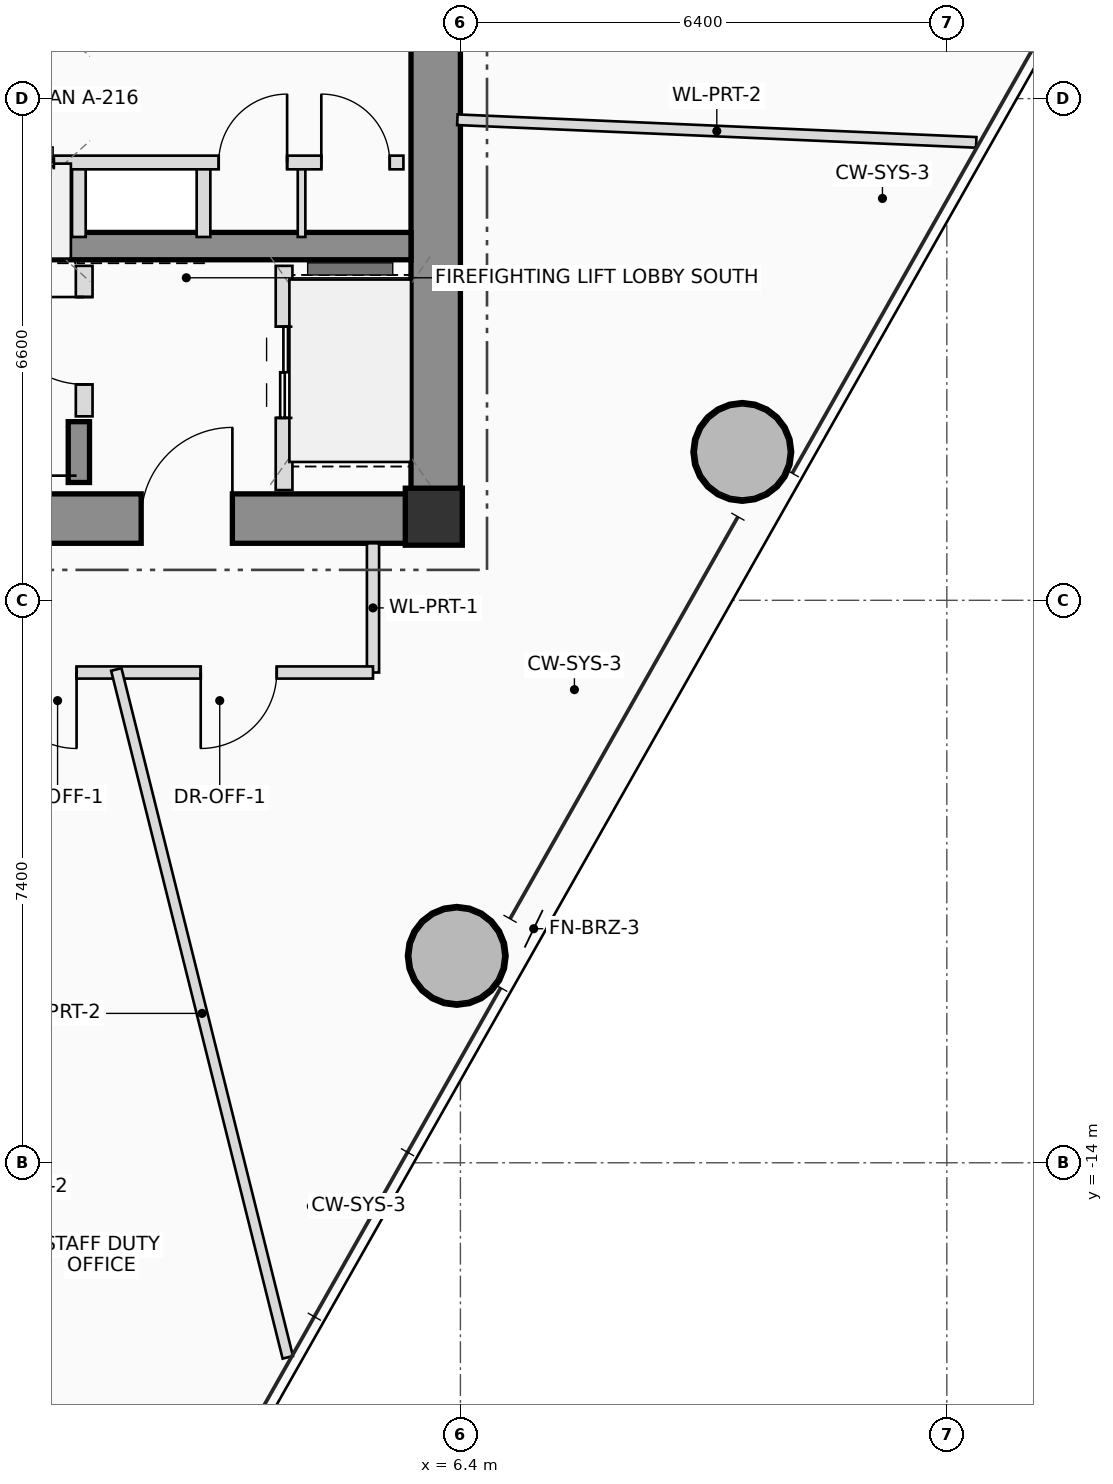
"""IFC4 building model, lengths in metres.
Left out: names, types, materials, properties, quantities, classifications, styles, units other than length and angle.
Written with IfcOpenShell. Run it as: python <this file> out.ifc"""

import sys

from ifc_helpers import new_model, si_unit, direction, frame, frame_2d, origin, origin_2d, place, context, subcontext, project, spatial, rectangle, hollow_circle, extrude, source, transform, mapped, element, fill, save


model = new_model("IFC4")
c1 = context("Model", 3, precision=1e-05, world=origin(), true_north=direction((0.0, 1.0)))
c2 = subcontext(c1, "Body", "Model", "MODEL_VIEW")
j1 = project(units=[si_unit("LENGTHUNIT", "METRE"), si_unit("PLANEANGLEUNIT", "RADIAN")], contexts=[c1])
p1 = place(None, origin())
s1 = spatial("IfcSite", under=j1, at=p1, CompositionType="ELEMENT")
p2 = place(p1, origin())
s2 = spatial("IfcBuilding", under=s1, at=p2, CompositionType="ELEMENT")
p3 = place(p2, frame((0.0, 0.0, 172.55)))
s3 = spatial("IfcBuildingStorey", under=s2, at=p3, CompositionType="ELEMENT", Elevation=172.55)
m1 = source(origin(), c2, "Body", "SweptSolid", [
    extrude(rectangle(XDim=0.75, YDim=0.75, at=origin_2d()), origin(), (0.0, 0.0, 1.0), 3.45),
])
p4 = place(p3, frame((6.05, -5.5, 0.0), z_axis=(0.0, 0.0, 1.0), x_axis=(1.0, 0.0, 0.0)))
e1 = element("IfcColumn", 1, at=p4, inside=s3, PredefinedType="COLUMN", context=c2, shape_type="MappedRepresentation", body=[
    mapped(m1, transform((0.0, 0.0, 0.0), scale=1.0)),
])
p5 = place(p3, frame((-6.4, -5.525, 0.0), z_axis=(0.0, 0.0, 1.0), x_axis=(1.0, 0.0, 0.0)))
e2 = element("IfcWall", 2, at=p5, inside=s3, PredefinedType="SHEAR", context=c2, shape_type="SweptSolid", body=[
    extrude(rectangle(XDim=12.8, YDim=0.65, at=frame_2d((6.4, 0.0))), origin(), (0.0, 0.0, 1.0), 3.45),
])
p6 = place(p5, frame((8.6, 0.0, 0.0)))
e3 = element("IfcOpeningElement", 3, at=p6, cuts=e2, PredefinedType="OPENING", context=c2, shape_type="SweptSolid", body=[
    extrude(rectangle(XDim=1.2, YDim=2.2, at=frame_2d((0.6, 1.1))), frame((0.0, 0.335, 0.0), z_axis=(0.0, -1.0, 0.0), x_axis=(1.0, 0.0, 0.0)), (0.0, 0.0, 1.0), 0.67),
])
p7 = place(p3, frame((6.075, -5.2, 0.0), z_axis=(0.0, 0.0, 1.0), x_axis=(0.0, 1.0, 0.0)))
e4 = element("IfcWall", 4, at=p7, inside=s3, PredefinedType="SHEAR", context=c2, shape_type="SweptSolid", body=[
    extrude(rectangle(XDim=10.4, YDim=0.65, at=frame_2d((5.2, 0.0))), origin(), (0.0, 0.0, 1.0), 3.45),
])
p8 = place(p3, frame((-5.75, -1.94, 0.0), z_axis=(0.0, 0.0, 1.0), x_axis=(1.0, 0.0, 0.0)))
e5 = element("IfcWall", 5, at=p8, inside=s3, PredefinedType="SHEAR", context=c2, shape_type="SweptSolid", body=[
    extrude(rectangle(XDim=11.5, YDim=0.36, at=frame_2d((5.75, 0.0))), origin(), (0.0, 0.0, 1.0), 3.45),
])
p9 = place(p3, frame((1.38, -5.05, 0.0), z_axis=(0.0, 0.0, 1.0), x_axis=(0.0, 1.0, 0.0)))
e6 = element("IfcWall", 6, at=p9, inside=s3, PredefinedType="SHEAR", context=c2, shape_type="SweptSolid", body=[
    extrude(rectangle(XDim=0.8, YDim=0.28, at=frame_2d((0.4, 0.0))), origin(), (0.0, 0.0, 1.0), 3.45),
])
m2 = source(origin(), c2, "Body", "SweptSolid", [
    extrude(hollow_circle(Radius=0.65, WallThickness=0.045, at=origin_2d()), origin(), (0.0, 0.0, 1.0), 3.45),
])
for number, where, z_axis, x_axis in (
    (7, (6.352, -11.278, 0.0), (0.0, 0.0, 1.0), (1.0, 0.0, 0.0)),
    (8, (10.109, -4.648, 0.0), (0.0, 0.0, 1.0), (1.0, 0.0, 0.0)),
):
    element("IfcColumn", number, at=place(p3, frame(where, z_axis=z_axis, x_axis=x_axis)), inside=s3, PredefinedType="COLUMN", context=c2, shape_type="MappedRepresentation", body=[
        mapped(m2, transform((0.0, 0.0, 0.0), scale=1.0)),
    ])
p10 = place(p3, frame((1.45, -4.18, 0.0), z_axis=(0.0, 0.0, 1.0), x_axis=(0.0, 1.0, 0.0)))
e9 = element("IfcWall", 9, at=p10, inside=s3, PredefinedType="PLUMBINGWALL", context=c2, shape_type="SweptSolid", body=[
    extrude(rectangle(XDim=1.98, YDim=0.22, at=frame_2d((0.99, 0.0))), origin(), (0.0, 0.0, 1.0), 3.25),
])
p11 = place(p10, frame((0.42, 0.0, 0.0)))
e10 = element("IfcOpeningElement", 10, at=p11, cuts=e9, PredefinedType="OPENING", context=c2, shape_type="SweptSolid", body=[
    extrude(rectangle(XDim=1.15, YDim=2.15, at=frame_2d((0.575, 1.075))), frame((0.0, 0.12, 0.0), z_axis=(0.0, -1.0, 0.0), x_axis=(1.0, 0.0, 0.0)), (0.0, 0.0, 1.0), 0.24),
])
p12 = place(p3, frame((4.08, -5.15, 0.0), z_axis=(0.0, 0.0, 1.0), x_axis=(0.0, 1.0, 0.0)))
e11 = element("IfcWall", 11, at=p12, inside=s3, PredefinedType="PLUMBINGWALL", context=c2, shape_type="SweptSolid", body=[
    extrude(rectangle(XDim=2.95, YDim=0.22, at=frame_2d((1.475, 0.0))), origin(), (0.0, 0.0, 1.0), 3.25),
])
p13 = place(p12, frame((0.95, 0.0, 0.0)))
e12 = element("IfcOpeningElement", 12, at=p13, cuts=e11, PredefinedType="OPENING", context=c2, shape_type="SweptSolid", body=[
    extrude(rectangle(XDim=1.2, YDim=2.25, at=frame_2d((0.6, 1.125))), frame((0.0, 0.12, 0.0), z_axis=(0.0, -1.0, 0.0), x_axis=(1.0, 0.0, 0.0)), (0.0, 0.0, 1.0), 0.24),
])
for number, where, z_axis, x_axis in (
    (13, (1.38, -1.82, 0.0), (0.0, 0.0, 1.0), (0.0, 1.0, 0.0)),
    (14, (3.02, -1.82, 0.0), (0.0, 0.0, 1.0), (0.0, 1.0, 0.0)),
):
    element("IfcWall", number, at=place(p3, frame(where, z_axis=z_axis, x_axis=x_axis)), inside=s3, PredefinedType="PLUMBINGWALL", context=c2, shape_type="SweptSolid", body=[
        extrude(rectangle(XDim=0.98, YDim=0.18, at=frame_2d((0.49, 0.0))), origin(), (0.0, 0.0, 1.0), 3.25),
    ])
p14 = place(p3, frame((4.31, -1.82, 0.0), z_axis=(0.0, 0.0, 1.0), x_axis=(0.0, 1.0, 0.0)))
e15 = element("IfcWall", 15, at=p14, inside=s3, PredefinedType="PARTITIONING", context=c2, shape_type="SweptSolid", body=[
    extrude(rectangle(XDim=0.98, YDim=0.1, at=frame_2d((0.49, 0.0))), origin(), (0.0, 0.0, 1.0), 3.25),
])
p15 = place(p3, frame((-5.68, -0.84, 0.0), z_axis=(0.0, 0.0, 1.0), x_axis=(1.0, 0.0, 0.0)))
e16 = element("IfcWall", 16, at=p15, inside=s3, PredefinedType="PLUMBINGWALL", context=c2, shape_type="SweptSolid", body=[
    extrude(rectangle(XDim=11.33, YDim=0.18, at=frame_2d((5.665, 0.0))), origin(), (0.0, 0.0, 1.0), 3.25),
])
p16 = place(p15, frame((1.18, 0.0, 0.0)))
e17 = element("IfcOpeningElement", 17, at=p16, cuts=e16, PredefinedType="OPENING", context=c2, shape_type="SweptSolid", body=[
    extrude(rectangle(XDim=0.9, YDim=2.05, at=frame_2d((0.45, 1.025))), frame((0.0, 0.1, 0.0), z_axis=(0.0, -1.0, 0.0), x_axis=(1.0, 0.0, 0.0)), (0.0, 0.0, 1.0), 0.2),
])
p17 = place(p15, frame((3.93, 0.0, 0.0)))
e18 = element("IfcOpeningElement", 18, at=p17, cuts=e16, PredefinedType="OPENING", context=c2, shape_type="SweptSolid", body=[
    extrude(rectangle(XDim=1.1, YDim=2.2, at=frame_2d((0.55, 1.1))), frame((0.0, 0.1, 0.0), z_axis=(0.0, -1.0, 0.0), x_axis=(1.0, 0.0, 0.0)), (0.0, 0.0, 1.0), 0.2),
])
p18 = place(p15, frame((5.63, 0.0, 0.0)))
e19 = element("IfcOpeningElement", 19, at=p18, cuts=e16, PredefinedType="OPENING", context=c2, shape_type="SweptSolid", body=[
    extrude(rectangle(XDim=1.1, YDim=2.2, at=frame_2d((0.55, 1.1))), frame((0.0, 0.1, 0.0), z_axis=(0.0, -1.0, 0.0), x_axis=(1.0, 0.0, 0.0)), (0.0, 0.0, 1.0), 0.2),
])
p19 = place(p15, frame((8.9, 0.0, 0.0)))
e20 = element("IfcOpeningElement", 20, at=p19, cuts=e16, PredefinedType="OPENING", context=c2, shape_type="SweptSolid", body=[
    extrude(rectangle(XDim=0.9, YDim=2.05, at=frame_2d((0.45, 1.025))), frame((0.0, 0.1, 0.0), z_axis=(0.0, -1.0, 0.0), x_axis=(1.0, 0.0, 0.0)), (0.0, 0.0, 1.0), 0.2),
])
p20 = place(p15, frame((10.25, 0.0, 0.0)))
e21 = element("IfcOpeningElement", 21, at=p20, cuts=e16, PredefinedType="OPENING", context=c2, shape_type="SweptSolid", body=[
    extrude(rectangle(XDim=0.9, YDim=2.05, at=frame_2d((0.45, 1.025))), frame((0.0, 0.1, 0.0), z_axis=(0.0, -1.0, 0.0), x_axis=(1.0, 0.0, 0.0)), (0.0, 0.0, 1.0), 0.2),
])
p21 = place(p3, frame((5.25, -5.85, 0.0), z_axis=(0.0, 0.0, 1.0), x_axis=(0.0, -1.0, 0.0)))
e22 = element("IfcWall", 22, at=p21, inside=s3, PredefinedType="PARTITIONING", context=c2, shape_type="SweptSolid", body=[
    extrude(rectangle(XDim=1.7, YDim=0.16, at=frame_2d((0.85, 0.0))), origin(), (0.0, 0.0, 1.0), 3.25),
])
p22 = place(p3, frame((5.25, -7.55, 0.0), z_axis=(0.0, 0.0, 1.0), x_axis=(-1.0, 0.0, 0.0)))
e23 = element("IfcWall", 23, at=p22, inside=s3, PredefinedType="PARTITIONING", context=c2, shape_type="SweptSolid", body=[
    extrude(rectangle(XDim=11.61, YDim=0.16, at=frame_2d((5.805, 0.0))), origin(), (0.0, 0.0, 1.0), 2.605),
])
p23 = place(p22, frame((1.267, 0.0, 0.0)))
e24 = element("IfcOpeningElement", 24, at=p23, cuts=e23, PredefinedType="OPENING", context=c2, shape_type="SweptSolid", body=[
    extrude(rectangle(XDim=1.0, YDim=2.25, at=frame_2d((0.5, 1.125))), frame((0.0, 0.09, 0.0), z_axis=(0.0, -1.0, 0.0), x_axis=(1.0, 0.0, 0.0)), (0.0, 0.0, 1.0), 0.18),
])
p24 = place(p22, frame((3.9, 0.0, 0.0)))
e25 = element("IfcOpeningElement", 25, at=p24, cuts=e23, PredefinedType="OPENING", context=c2, shape_type="SweptSolid", body=[
    extrude(rectangle(XDim=1.0, YDim=2.25, at=frame_2d((0.5, 1.125))), frame((0.0, 0.09, 0.0), z_axis=(0.0, -1.0, 0.0), x_axis=(1.0, 0.0, 0.0)), (0.0, 0.0, 1.0), 0.18),
])
p25 = place(p22, frame((7.936, 0.0, 0.0)))
e26 = element("IfcOpeningElement", 26, at=p25, cuts=e23, PredefinedType="OPENING", context=c2, shape_type="SweptSolid", body=[
    extrude(rectangle(XDim=1.0, YDim=2.25, at=frame_2d((0.5, 1.125))), frame((0.0, 0.09, 0.0), z_axis=(0.0, -1.0, 0.0), x_axis=(1.0, 0.0, 0.0)), (0.0, 0.0, 1.0), 0.18),
])
p26 = place(p3, frame((6.36, -0.278, 0.0), z_axis=(0.0, 0.0, 1.0), x_axis=(0.999047983793, -0.043624833281, 0.0)))
e27 = element("IfcWall", 27, at=p26, inside=s3, PredefinedType="PARTITIONING", context=c2, shape_type="SweptSolid", body=[
    extrude(rectangle(XDim=6.833, YDim=0.14, at=frame_2d((3.417, 0.0))), origin(), (0.0, 0.0, 1.0), 2.605),
])
p27 = place(p3, frame((1.873, -7.51, 0.0), z_axis=(0.0, 0.0, 1.0), x_axis=(0.241919667538, -0.970296281791, 0.0)))
e28 = element("IfcWall", 28, at=p27, inside=s3, PredefinedType="PARTITIONING", context=c2, shape_type="SweptSolid", body=[
    extrude(rectangle(XDim=9.327, YDim=0.14, at=frame_2d((4.664, 0.0))), origin(), (0.0, 0.0, 1.0), 2.605),
])
p28 = place(p6, origin())
e29 = element("IfcDoor", 29, at=p28, inside=s3, OperationType="SINGLE_SWING_RIGHT", PredefinedType="DOOR", context=c2, shape_type="SweptSolid", body=[
    extrude(rectangle(XDim=1.2, YDim=2.2, at=frame_2d((0.6, 1.1))), frame((0.0, 0.025, 0.0), z_axis=(0.0, -1.0, 0.0), x_axis=(1.0, 0.0, 0.0)), (0.0, 0.0, 1.0), 0.05),
])
fill(e3, e29)
p29 = place(p11, origin())
e30 = element("IfcDoor", 30, at=p29, inside=s3, OperationType="SINGLE_SWING_RIGHT", PredefinedType="DOOR", context=c2, shape_type="SweptSolid", body=[
    extrude(rectangle(XDim=1.15, YDim=2.15, at=frame_2d((0.575, 1.075))), frame((0.0, 0.025, 0.0), z_axis=(0.0, -1.0, 0.0), x_axis=(1.0, 0.0, 0.0)), (0.0, 0.0, 1.0), 0.05),
])
fill(e10, e30)
p30 = place(p13, origin())
e31 = element("IfcDoor", 31, at=p30, inside=s3, OperationType="DOUBLE_DOOR_SLIDING", PredefinedType="DOOR", context=c2, shape_type="SweptSolid", body=[
    extrude(rectangle(XDim=1.2, YDim=2.25, at=frame_2d((0.6, 1.125))), frame((0.0, 0.025, 0.0), z_axis=(0.0, -1.0, 0.0), x_axis=(1.0, 0.0, 0.0)), (0.0, 0.0, 1.0), 0.05),
])
fill(e12, e31)
p31 = place(p18, origin())
e32 = element("IfcDoor", 32, at=p31, inside=s3, OperationType="DOUBLE_DOOR_SLIDING", PredefinedType="DOOR", context=c2, shape_type="SweptSolid", body=[
    extrude(rectangle(XDim=1.1, YDim=2.2, at=frame_2d((0.55, 1.1))), frame((0.0, 0.025, 0.0), z_axis=(0.0, -1.0, 0.0), x_axis=(1.0, 0.0, 0.0)), (0.0, 0.0, 1.0), 0.05),
])
fill(e19, e32)
p32 = place(p19, origin())
e33 = element("IfcDoor", 33, at=p32, inside=s3, OperationType="SINGLE_SWING_RIGHT", PredefinedType="DOOR", context=c2, shape_type="SweptSolid", body=[
    extrude(rectangle(XDim=0.9, YDim=2.05, at=frame_2d((0.45, 1.025))), frame((0.0, 0.025, 0.0), z_axis=(0.0, -1.0, 0.0), x_axis=(1.0, 0.0, 0.0)), (0.0, 0.0, 1.0), 0.05),
])
fill(e20, e33)
p33 = place(p20, origin())
e34 = element("IfcDoor", 34, at=p33, inside=s3, OperationType="SINGLE_SWING_LEFT", PredefinedType="DOOR", context=c2, shape_type="SweptSolid", body=[
    extrude(rectangle(XDim=0.9, YDim=2.05, at=frame_2d((0.45, 1.025))), frame((0.0, 0.025, 0.0), z_axis=(0.0, -1.0, 0.0), x_axis=(1.0, 0.0, 0.0)), (0.0, 0.0, 1.0), 0.05),
])
fill(e21, e34)
p34 = place(p23, origin())
e35 = element("IfcDoor", 35, at=p34, inside=s3, OperationType="SINGLE_SWING_RIGHT", PredefinedType="DOOR", context=c2, shape_type="SweptSolid", body=[
    extrude(rectangle(XDim=1.0, YDim=2.25, at=frame_2d((0.5, 1.125))), frame((0.0, 0.025, 0.0), z_axis=(0.0, -1.0, 0.0), x_axis=(1.0, 0.0, 0.0)), (0.0, 0.0, 1.0), 0.05),
])
fill(e24, e35)
p35 = place(p24, origin())
e36 = element("IfcDoor", 36, at=p35, inside=s3, OperationType="SINGLE_SWING_LEFT", PredefinedType="DOOR", context=c2, shape_type="SweptSolid", body=[
    extrude(rectangle(XDim=1.0, YDim=2.25, at=frame_2d((0.5, 1.125))), frame((0.0, 0.025, 0.0), z_axis=(0.0, -1.0, 0.0), x_axis=(1.0, 0.0, 0.0)), (0.0, 0.0, 1.0), 0.05),
])
fill(e25, e36)
save(model, sys.argv[1])
